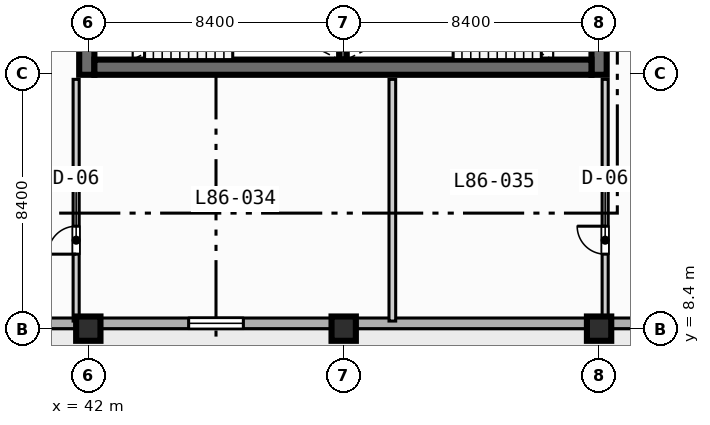
"""IFC4 building model, lengths in metres.
Left out: names, types, materials, properties, quantities, classifications, styles, units other than length and angle.
Written with IfcOpenShell. Run it as: python <this file> out.ifc"""

import sys

from ifc_helpers import new_model, si_unit, direction, frame, frame_2d, origin, origin_2d, place, context, subcontext, project, spatial, rectangle, extrude, element, fill, save


model = new_model("IFC4")
c1 = context("Model", 3, precision=1e-05, world=origin(), true_north=direction((0.0, 1.0)))
c2 = subcontext(c1, "Body", "Model", "MODEL_VIEW")
j1 = project(units=[si_unit("LENGTHUNIT", "METRE"), si_unit("PLANEANGLEUNIT", "RADIAN")], contexts=[c1])
p1 = place(None, origin())
s1 = spatial("IfcSite", under=j1, at=p1, CompositionType="ELEMENT")
p2 = place(p1, origin())
s2 = spatial("IfcBuilding", under=s1, at=p2, CompositionType="ELEMENT")
p3 = place(p2, frame((0.0, 0.0, 347.6)))
s3 = spatial("IfcBuildingStorey", under=s2, at=p3, CompositionType="ELEMENT", Elevation=347.6)
p4 = place(p3, frame((50.375, 17.25, 0.0), z_axis=(0.0, 0.0, 1.0), x_axis=(0.0, 1.0, 0.0)))
e1 = element("IfcWall", 1, at=p4, inside=s3, PredefinedType="SOLIDWALL", context=c2, shape_type="SweptSolid", body=[
    extrude(rectangle(XDim=3.5, YDim=0.25, at=frame_2d((1.75, 0.0))), origin(), (0.0, 0.0, 1.0), 3.67),
])
for number, where, z_axis, x_axis in (
    (2, (41.95, 16.75, 0.0), (0.0, 0.0, 1.0), (0.0, 1.0, 0.0)),
    (3, (58.8, 16.75, 0.0), (0.0, 0.0, 1.0), (0.0, 1.0, 0.0)),
):
    element("IfcWall", number, at=place(p3, frame(where, z_axis=z_axis, x_axis=x_axis)), inside=s3, PredefinedType="SHEAR", context=c2, shape_type="SweptSolid", body=[
        extrude(rectangle(XDim=1.25, YDim=0.5, at=frame_2d((0.625, 0.0))), origin(), (0.0, 0.0, 1.0), 3.67),
    ])
p5 = place(p3, frame((42.2, 17.0, 0.0), z_axis=(0.0, 0.0, 1.0), x_axis=(1.0, 0.0, 0.0)))
e4 = element("IfcWall", 4, at=p5, inside=s3, PredefinedType="SHEAR", context=c2, shape_type="SweptSolid", body=[
    extrude(rectangle(XDim=16.35, YDim=0.5, at=frame_2d((8.175, 0.0))), origin(), (0.0, 0.0, 1.0), 3.67),
])
for number, where, z_axis, x_axis in (
    (5, (42.0, 8.4, 0.0), (0.0, 0.0, 1.0), (1.0, 0.0, 0.0)),
    (6, (50.4, 8.4, 0.0), (0.0, 0.0, 1.0), (1.0, 0.0, 0.0)),
    (7, (58.8, 8.4, 0.0), (0.0, 0.0, 1.0), (1.0, 0.0, 0.0)),
):
    element("IfcColumn", number, at=place(p3, frame(where, z_axis=z_axis, x_axis=x_axis)), inside=s3, PredefinedType="COLUMN", context=c2, shape_type="SweptSolid", body=[
        extrude(rectangle(XDim=0.8, YDim=0.8, at=origin_2d()), origin(), (0.0, 0.0, 1.0), 3.9),
    ])
p6 = place(p3, frame((64.025, 8.575, 0.0), z_axis=(0.0, 0.0, 1.0), x_axis=(-1.0, 0.0, 0.0)))
e8 = element("IfcWall", 8, at=p6, inside=s3, PredefinedType="STANDARD", context=c2, shape_type="SweptSolid", body=[
    extrude(rectangle(XDim=52.45, YDim=0.35, at=frame_2d((26.225, 0.0))), origin(), (0.0, 0.0, 1.0), 3.67),
])
p7 = place(p6, frame((33.425, 0.0, 0.0)))
e9 = element("IfcOpeningElement", 9, at=p7, cuts=e8, PredefinedType="OPENING", context=c2, shape_type="SweptSolid", body=[
    extrude(rectangle(XDim=1.4, YDim=2.2, at=frame_2d((0.7, 1.1))), frame((0.0, 0.185, 0.0), z_axis=(0.0, -1.0, 0.0), x_axis=(1.0, 0.0, 0.0)), (0.0, 0.0, 1.0), 0.37),
])
p8 = place(p6, frame((41.825, 0.0, 0.85)))
e10 = element("IfcOpeningElement", 10, at=p8, cuts=e8, PredefinedType="OPENING", context=c2, shape_type="SweptSolid", body=[
    extrude(rectangle(XDim=2.4, YDim=1.95, at=frame_2d((1.2, 0.975))), frame((0.0, 0.185, 0.0), z_axis=(0.0, -1.0, 0.0), x_axis=(1.0, 0.0, 0.0)), (0.0, 0.0, 1.0), 0.37),
])
p9 = place(p6, frame((25.025, 0.0, 0.85)))
e11 = element("IfcOpeningElement", 11, at=p9, cuts=e8, PredefinedType="OPENING", context=c2, shape_type="SweptSolid", body=[
    extrude(rectangle(XDim=2.4, YDim=1.95, at=frame_2d((1.2, 0.975))), frame((0.0, 0.185, 0.0), z_axis=(0.0, -1.0, 0.0), x_axis=(1.0, 0.0, 0.0)), (0.0, 0.0, 1.0), 0.37),
])
p10 = place(p6, frame((16.925, 0.0, 0.85)))
e12 = element("IfcOpeningElement", 12, at=p10, cuts=e8, PredefinedType="OPENING", context=c2, shape_type="SweptSolid", body=[
    extrude(rectangle(XDim=1.8, YDim=1.8, at=frame_2d((0.9, 0.9))), frame((0.0, 0.185, 0.0), z_axis=(0.0, -1.0, 0.0), x_axis=(1.0, 0.0, 0.0)), (0.0, 0.0, 1.0), 0.37),
])
p11 = place(p6, frame((48.575, 0.0, 0.85)))
e13 = element("IfcOpeningElement", 13, at=p11, cuts=e8, PredefinedType="OPENING", context=c2, shape_type="SweptSolid", body=[
    extrude(rectangle(XDim=1.8, YDim=1.8, at=frame_2d((0.9, 0.9))), frame((0.0, 0.185, 0.0), z_axis=(0.0, -1.0, 0.0), x_axis=(1.0, 0.0, 0.0)), (0.0, 0.0, 1.0), 0.37),
])
p12 = place(p6, frame((36.325, 0.0, 0.85)))
e14 = element("IfcOpeningElement", 14, at=p12, cuts=e8, PredefinedType="OPENING", context=c2, shape_type="SweptSolid", body=[
    extrude(rectangle(XDim=1.8, YDim=1.8, at=frame_2d((0.9, 0.9))), frame((0.0, 0.185, 0.0), z_axis=(0.0, -1.0, 0.0), x_axis=(1.0, 0.0, 0.0)), (0.0, 0.0, 1.0), 0.37),
])
p13 = place(p3, frame((41.6, 8.65, 0.0), z_axis=(0.0, 0.0, 1.0), x_axis=(0.0, 1.0, 0.0)))
e15 = element("IfcWall", 15, at=p13, inside=s3, PredefinedType="PARTITIONING", context=c2, shape_type="SweptSolid", body=[
    extrude(rectangle(XDim=7.95, YDim=0.2, at=frame_2d((3.975, 0.0))), origin(), (0.0, 0.0, 1.0), 3.67),
])
p14 = place(p13, frame((2.2, 0.0, 0.0)))
e16 = element("IfcOpeningElement", 16, at=p14, cuts=e15, PredefinedType="OPENING", context=c2, shape_type="SweptSolid", body=[
    extrude(rectangle(XDim=0.92, YDim=2.1, at=frame_2d((0.46, 1.05))), frame((0.0, 0.11, 0.0), z_axis=(0.0, -1.0, 0.0), x_axis=(1.0, 0.0, 0.0)), (0.0, 0.0, 1.0), 0.22),
])
p15 = place(p3, frame((59.0, 8.65, 0.0), z_axis=(0.0, 0.0, 1.0), x_axis=(0.0, 1.0, 0.0)))
e17 = element("IfcWall", 17, at=p15, inside=s3, PredefinedType="PARTITIONING", context=c2, shape_type="SweptSolid", body=[
    extrude(rectangle(XDim=7.95, YDim=0.2, at=frame_2d((3.975, 0.0))), origin(), (0.0, 0.0, 1.0), 3.059),
])
p16 = place(p15, frame((2.2, 0.0, 0.0)))
e18 = element("IfcOpeningElement", 18, at=p16, cuts=e17, PredefinedType="OPENING", context=c2, shape_type="SweptSolid", body=[
    extrude(rectangle(XDim=0.92, YDim=2.1, at=frame_2d((0.46, 1.05))), frame((0.0, 0.11, 0.0), z_axis=(0.0, -1.0, 0.0), x_axis=(1.0, 0.0, 0.0)), (0.0, 0.0, 1.0), 0.22),
])
p17 = place(p3, frame((52.0, 8.65, 0.0), z_axis=(0.0, 0.0, 1.0), x_axis=(0.0, 1.0, 0.0)))
e19 = element("IfcWall", 19, at=p17, inside=s3, PredefinedType="PARTITIONING", context=c2, shape_type="SweptSolid", body=[
    extrude(rectangle(XDim=7.95, YDim=0.22, at=frame_2d((3.975, 0.0))), origin(), (0.0, 0.0, 1.0), 3.67),
])
p18 = place(p10, origin())
e20 = element("IfcWindow", 20, at=p18, inside=s3, PartitioningType="SINGLE_PANEL", PredefinedType="WINDOW", context=c2, shape_type="SweptSolid", body=[
    extrude(rectangle(XDim=1.8, YDim=1.8, at=frame_2d((0.9, 0.9))), frame((0.0, 0.03, 0.0), z_axis=(0.0, -1.0, 0.0), x_axis=(1.0, 0.0, 0.0)), (0.0, 0.0, 1.0), 0.06),
])
fill(e12, e20)
p19 = place(p14, origin())
e21 = element("IfcDoor", 21, at=p19, inside=s3, OperationType="SINGLE_SWING_LEFT", PredefinedType="DOOR", context=c2, shape_type="SweptSolid", body=[
    extrude(rectangle(XDim=0.92, YDim=2.1, at=frame_2d((0.46, 1.05))), frame((0.0, 0.025, 0.0), z_axis=(0.0, -1.0, 0.0), x_axis=(1.0, 0.0, 0.0)), (0.0, 0.0, 1.0), 0.05),
])
fill(e16, e21)
p20 = place(p16, origin())
e22 = element("IfcDoor", 22, at=p20, inside=s3, OperationType="SINGLE_SWING_RIGHT", PredefinedType="DOOR", context=c2, shape_type="SweptSolid", body=[
    extrude(rectangle(XDim=0.92, YDim=2.1, at=frame_2d((0.46, 1.05))), frame((0.0, 0.025, 0.0), z_axis=(0.0, -1.0, 0.0), x_axis=(1.0, 0.0, 0.0)), (0.0, 0.0, 1.0), 0.05),
])
fill(e18, e22)
save(model, sys.argv[1])
